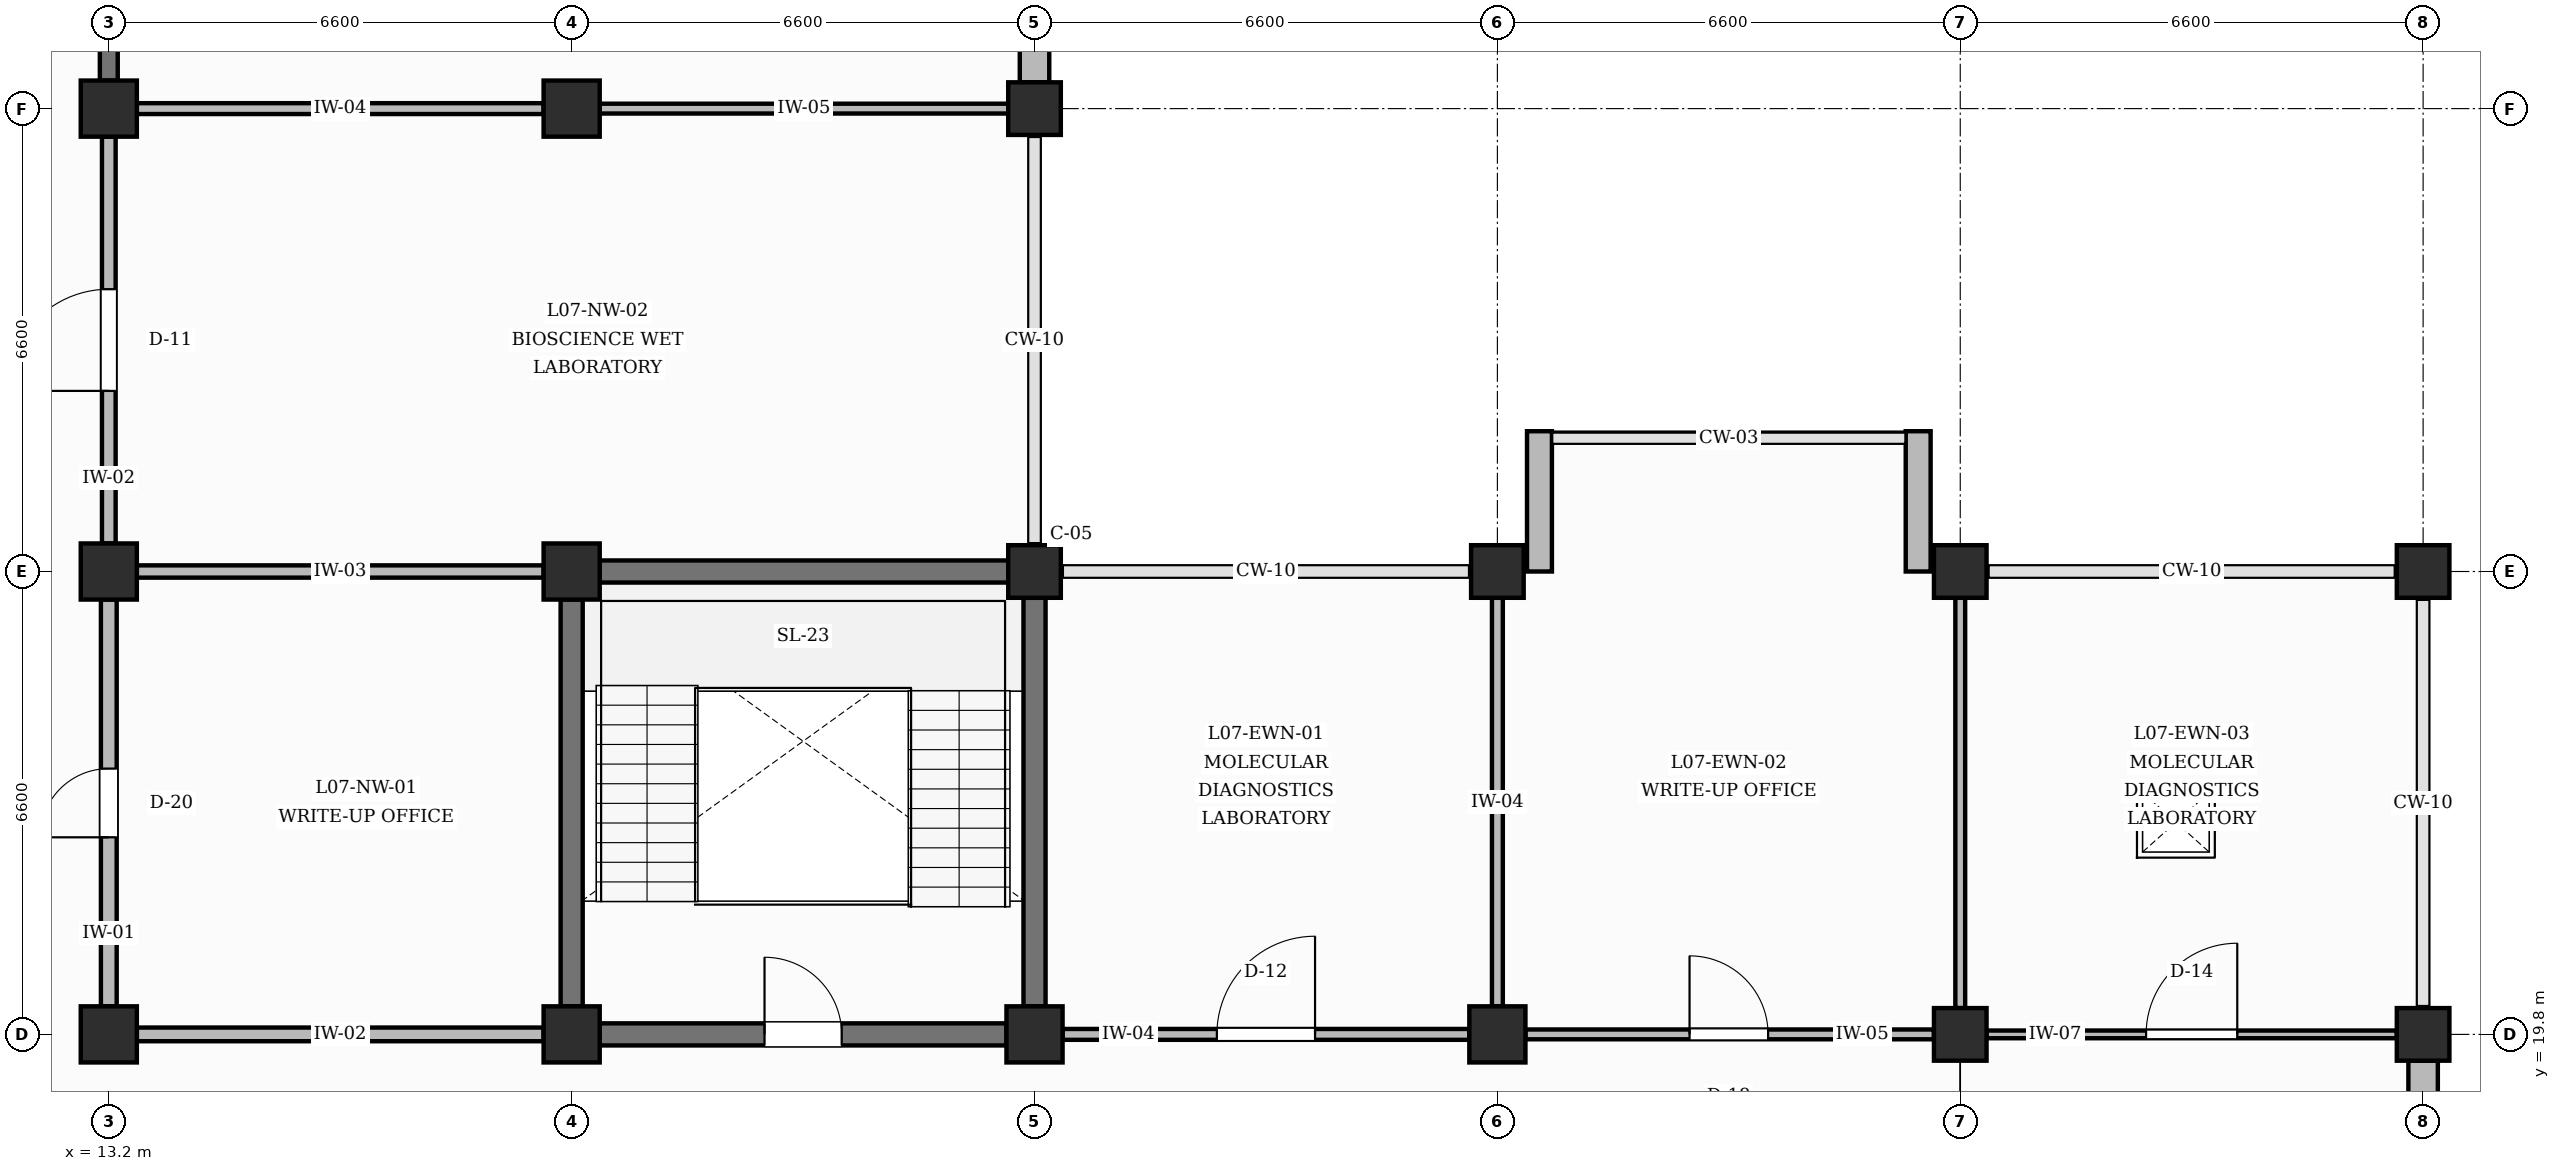
"""IFC4 building model, lengths in metres.
Left out: names, types, materials, properties, quantities, classifications, styles, units other than length and angle.
Written with IfcOpenShell. Run it as: python <this file> out.ifc"""

import sys

from ifc_helpers import new_model, si_unit, direction, frame, frame_2d, origin, origin_2d, place, context, subcontext, project, spatial, rectangle, extrude, element, fill, save


model = new_model("IFC4")
c1 = context("Model", 3, precision=1e-05, world=origin(), true_north=direction((0.0, 1.0)))
c2 = subcontext(c1, "Body", "Model", "MODEL_VIEW")
j1 = project(units=[si_unit("LENGTHUNIT", "METRE"), si_unit("PLANEANGLEUNIT", "RADIAN")], contexts=[c1])
p1 = place(None, origin())
s1 = spatial("IfcSite", under=j1, at=p1, CompositionType="ELEMENT")
p2 = place(p1, origin())
s2 = spatial("IfcBuilding", under=s1, at=p2, CompositionType="ELEMENT")
p3 = place(p2, frame((0.0, 0.0, 31.2)))
s3 = spatial("IfcBuildingStorey", under=s2, at=p3, CompositionType="ELEMENT", Elevation=31.2)
for number, where, z_axis, x_axis in (
    (1, (13.2, 19.8, 0.0), (0.0, 0.0, 1.0), (1.0, 0.0, 0.0)),
    (2, (13.2, 26.4, 0.0), (0.0, 0.0, 1.0), (1.0, 0.0, 0.0)),
    (3, (13.2, 33.0, 0.0), (0.0, 0.0, 1.0), (1.0, 0.0, 0.0)),
    (4, (19.8, 19.8, 0.0), (0.0, 0.0, 1.0), (1.0, 0.0, 0.0)),
    (5, (19.8, 26.4, 0.0), (0.0, 0.0, 1.0), (1.0, 0.0, 0.0)),
    (6, (19.8, 33.0, 0.0), (0.0, 0.0, 1.0), (1.0, 0.0, 0.0)),
    (7, (26.4, 19.8, 0.0), (0.0, 0.0, 1.0), (1.0, 0.0, 0.0)),
):
    element("IfcColumn", number, at=place(p3, frame(where, z_axis=z_axis, x_axis=x_axis)), inside=s3, PredefinedType="COLUMN", context=c2, shape_type="SweptSolid", body=[
        extrude(rectangle(XDim=0.8, YDim=0.8, at=origin_2d()), origin(), (0.0, 0.0, 1.0), 4.2),
    ])
for number, where, z_axis, x_axis in (
    (8, (26.4, 26.4, 0.0), (0.0, 0.0, 1.0), (1.0, 0.0, 0.0)),
    (9, (26.4, 33.0, 0.0), (0.0, 0.0, 1.0), (1.0, 0.0, 0.0)),
):
    element("IfcColumn", number, at=place(p3, frame(where, z_axis=z_axis, x_axis=x_axis)), inside=s3, PredefinedType="COLUMN", context=c2, shape_type="SweptSolid", body=[
        extrude(rectangle(XDim=0.75, YDim=0.75, at=origin_2d()), origin(), (0.0, 0.0, 1.0), 4.2),
    ])
p4 = place(p3, frame((33.0, 19.8, 0.0), z_axis=(0.0, 0.0, 1.0), x_axis=(1.0, 0.0, 0.0)))
e10 = element("IfcColumn", 10, at=p4, inside=s3, PredefinedType="COLUMN", context=c2, shape_type="SweptSolid", body=[
    extrude(rectangle(XDim=0.8, YDim=0.8, at=origin_2d()), origin(), (0.0, 0.0, 1.0), 4.2),
])
for number, where, z_axis, x_axis in (
    (11, (33.0, 26.4, 0.0), (0.0, 0.0, 1.0), (1.0, 0.0, 0.0)),
    (12, (39.6, 19.8, 0.0), (0.0, 0.0, 1.0), (1.0, 0.0, 0.0)),
    (13, (39.6, 26.4, 0.0), (0.0, 0.0, 1.0), (1.0, 0.0, 0.0)),
    (14, (46.2, 19.8, 0.0), (0.0, 0.0, 1.0), (1.0, 0.0, 0.0)),
    (15, (46.2, 26.4, 0.0), (0.0, 0.0, 1.0), (1.0, 0.0, 0.0)),
):
    element("IfcColumn", number, at=place(p3, frame(where, z_axis=z_axis, x_axis=x_axis)), inside=s3, PredefinedType="COLUMN", context=c2, shape_type="SweptSolid", body=[
        extrude(rectangle(XDim=0.75, YDim=0.75, at=origin_2d()), origin(), (0.0, 0.0, 1.0), 4.2),
    ])
p5 = place(p3, frame((26.4, 33.375, 0.0), z_axis=(0.0, 0.0, 1.0), x_axis=(0.0, 1.0, 0.0)))
e16 = element("IfcWall", 16, at=p5, inside=s3, PredefinedType="SOLIDWALL", context=c2, shape_type="SweptSolid", body=[
    extrude(rectangle(XDim=5.85, YDim=0.42, at=frame_2d((2.925, 0.0))), origin(), (0.0, 0.0, 1.0), 3.28),
])
p6 = place(p5, frame((1.715, 0.0, 0.95)))
e17 = element("IfcOpeningElement", 17, at=p6, cuts=e16, PredefinedType="OPENING", context=c2, shape_type="SweptSolid", body=[
    extrude(rectangle(XDim=2.42, YDim=1.68, at=frame_2d((1.21, 0.84))), frame((0.0, 0.22, 0.0), z_axis=(0.0, -1.0, 0.0), x_axis=(1.0, 0.0, 0.0)), (0.0, 0.0, 1.0), 0.44),
])
for number, where, z_axis, x_axis in (
    (18, (33.6, 26.4, 0.0), (0.0, 0.0, 1.0), (0.0, 1.0, 0.0)),
    (19, (39.0, 26.4, 0.0), (0.0, 0.0, 1.0), (0.0, 1.0, 0.0)),
):
    element("IfcWall", number, at=place(p3, frame(where, z_axis=z_axis, x_axis=x_axis)), inside=s3, PredefinedType="SOLIDWALL", context=c2, shape_type="SweptSolid", body=[
        extrude(rectangle(XDim=2.0, YDim=0.355, at=frame_2d((1.0, 0.0))), origin(), (0.0, 0.0, 1.0), 3.28),
    ])
p7 = place(p3, frame((46.2, 13.575, 0.0), z_axis=(0.0, 0.0, 1.0), x_axis=(0.0, 1.0, 0.0)))
e20 = element("IfcWall", 20, at=p7, inside=s3, PredefinedType="SOLIDWALL", context=c2, shape_type="SweptSolid", body=[
    extrude(rectangle(XDim=5.85, YDim=0.42, at=frame_2d((2.925, 0.0))), origin(), (0.0, 0.0, 1.0), 3.28),
])
p8 = place(p7, frame((0.8, 0.0, 0.95)))
e21 = element("IfcOpeningElement", 21, at=p8, cuts=e20, PredefinedType="OPENING", context=c2, shape_type="SweptSolid", body=[
    extrude(rectangle(XDim=1.02, YDim=1.3, at=frame_2d((0.51, 0.65))), frame((0.0, 0.22, 0.0), z_axis=(0.0, -1.0, 0.0), x_axis=(1.0, 0.0, 0.0)), (0.0, 0.0, 1.0), 0.44),
])
p9 = place(p7, frame((4.03, 0.0, 0.95)))
e22 = element("IfcOpeningElement", 22, at=p9, cuts=e20, PredefinedType="OPENING", context=c2, shape_type="SweptSolid", body=[
    extrude(rectangle(XDim=1.02, YDim=1.3, at=frame_2d((0.51, 0.65))), frame((0.0, 0.22, 0.0), z_axis=(0.0, -1.0, 0.0), x_axis=(1.0, 0.0, 0.0)), (0.0, 0.0, 1.0), 0.44),
])
p10 = place(p3, frame((20.2, 19.8, 0.0), z_axis=(0.0, 0.0, 1.0), x_axis=(1.0, 0.0, 0.0)))
e23 = element("IfcWall", 23, at=p10, inside=s3, PredefinedType="SHEAR", context=c2, shape_type="SweptSolid", body=[
    extrude(rectangle(XDim=5.8, YDim=0.315, at=frame_2d((2.9, 0.0))), origin(), (0.0, 0.0, 1.0), 3.18),
])
p11 = place(p10, frame((2.35, 0.0, 0.0)))
e24 = element("IfcOpeningElement", 24, at=p11, cuts=e23, PredefinedType="OPENING", context=c2, shape_type="SweptSolid", body=[
    extrude(rectangle(XDim=1.1, YDim=2.15, at=frame_2d((0.55, 1.075))), frame((0.0, 0.167, 0.0), z_axis=(0.0, -1.0, 0.0), x_axis=(1.0, 0.0, 0.0)), (0.0, 0.0, 1.0), 0.335),
])
p12 = place(p3, frame((20.2, 26.4, 0.0), z_axis=(0.0, 0.0, 1.0), x_axis=(1.0, 0.0, 0.0)))
e25 = element("IfcWall", 25, at=p12, inside=s3, PredefinedType="SHEAR", context=c2, shape_type="SweptSolid", body=[
    extrude(rectangle(XDim=5.825, YDim=0.315, at=frame_2d((2.913, 0.0))), origin(), (0.0, 0.0, 1.0), 3.18),
])
p13 = place(p3, frame((19.8, 20.2, 0.0), z_axis=(0.0, 0.0, 1.0), x_axis=(0.0, 1.0, 0.0)))
e26 = element("IfcWall", 26, at=p13, inside=s3, PredefinedType="SHEAR", context=c2, shape_type="SweptSolid", body=[
    extrude(rectangle(XDim=5.8, YDim=0.315, at=frame_2d((2.9, 0.0))), origin(), (0.0, 0.0, 1.0), 3.18),
])
p14 = place(p3, frame((26.4, 20.2, 0.0), z_axis=(0.0, 0.0, 1.0), x_axis=(0.0, 1.0, 0.0)))
e27 = element("IfcWall", 27, at=p14, inside=s3, PredefinedType="SHEAR", context=c2, shape_type="SweptSolid", body=[
    extrude(rectangle(XDim=5.825, YDim=0.315, at=frame_2d((2.913, 0.0))), origin(), (0.0, 0.0, 1.0), 3.18),
])
p15 = place(p3, frame((13.2, 20.2, 0.0), z_axis=(0.0, 0.0, 1.0), x_axis=(0.0, 1.0, 0.0)))
e28 = element("IfcWall", 28, at=p15, inside=s3, PredefinedType="PARTITIONING", context=c2, shape_type="SweptSolid", body=[
    extrude(rectangle(XDim=5.8, YDim=0.225, at=frame_2d((2.9, 0.0))), origin(), (0.0, 0.0, 1.0), 3.18),
])
p16 = place(p15, frame((2.41, 0.0, 0.0)))
e29 = element("IfcOpeningElement", 29, at=p16, cuts=e28, PredefinedType="OPENING", context=c2, shape_type="SweptSolid", body=[
    extrude(rectangle(XDim=0.98, YDim=2.15, at=frame_2d((0.49, 1.075))), frame((0.0, 0.123, 0.0), z_axis=(0.0, -1.0, 0.0), x_axis=(1.0, 0.0, 0.0)), (0.0, 0.0, 1.0), 0.245),
])
p17 = place(p3, frame((13.2, 26.8, 0.0), z_axis=(0.0, 0.0, 1.0), x_axis=(0.0, 1.0, 0.0)))
e30 = element("IfcWall", 30, at=p17, inside=s3, PredefinedType="PARTITIONING", context=c2, shape_type="SweptSolid", body=[
    extrude(rectangle(XDim=5.8, YDim=0.195, at=frame_2d((2.9, 0.0))), origin(), (0.0, 0.0, 1.0), 3.18),
])
p18 = place(p17, frame((2.175, 0.0, 0.0)))
e31 = element("IfcOpeningElement", 31, at=p18, cuts=e30, PredefinedType="OPENING", context=c2, shape_type="SweptSolid", body=[
    extrude(rectangle(XDim=1.45, YDim=2.25, at=frame_2d((0.725, 1.125))), frame((0.0, 0.107, 0.0), z_axis=(0.0, -1.0, 0.0), x_axis=(1.0, 0.0, 0.0)), (0.0, 0.0, 1.0), 0.215),
])
p19 = place(p3, frame((13.2, 33.4, 0.0), z_axis=(0.0, 0.0, 1.0), x_axis=(0.0, 1.0, 0.0)))
e32 = element("IfcWall", 32, at=p19, inside=s3, PredefinedType="SHEAR", context=c2, shape_type="SweptSolid", body=[
    extrude(rectangle(XDim=5.8, YDim=0.255, at=frame_2d((2.9, 0.0))), origin(), (0.0, 0.0, 1.0), 3.18),
])
p20 = place(p19, frame((2.2, 0.0, 0.0)))
e33 = element("IfcOpeningElement", 33, at=p20, cuts=e32, PredefinedType="OPENING", context=c2, shape_type="SweptSolid", body=[
    extrude(rectangle(XDim=1.4, YDim=2.25, at=frame_2d((0.7, 1.125))), frame((0.0, 0.137, 0.0), z_axis=(0.0, -1.0, 0.0), x_axis=(1.0, 0.0, 0.0)), (0.0, 0.0, 1.0), 0.275),
])
p21 = place(p3, frame((13.6, 19.8, 0.0), z_axis=(0.0, 0.0, 1.0), x_axis=(1.0, 0.0, 0.0)))
e34 = element("IfcWall", 34, at=p21, inside=s3, PredefinedType="PARTITIONING", context=c2, shape_type="SweptSolid", body=[
    extrude(rectangle(XDim=5.8, YDim=0.195, at=frame_2d((2.9, 0.0))), origin(), (0.0, 0.0, 1.0), 3.18),
])
p22 = place(p3, frame((13.6, 26.4, 0.0), z_axis=(0.0, 0.0, 1.0), x_axis=(1.0, 0.0, 0.0)))
e35 = element("IfcWall", 35, at=p22, inside=s3, PredefinedType="PARTITIONING", context=c2, shape_type="SweptSolid", body=[
    extrude(rectangle(XDim=5.8, YDim=0.175, at=frame_2d((2.9, 0.0))), origin(), (0.0, 0.0, 1.0), 3.18),
])
p23 = place(p3, frame((13.6, 33.0, 0.0), z_axis=(0.0, 0.0, 1.0), x_axis=(1.0, 0.0, 0.0)))
e36 = element("IfcWall", 36, at=p23, inside=s3, PredefinedType="PARTITIONING", context=c2, shape_type="SweptSolid", body=[
    extrude(rectangle(XDim=5.8, YDim=0.155, at=frame_2d((2.9, 0.0))), origin(), (0.0, 0.0, 1.0), 3.18),
])
p24 = place(p3, frame((20.2, 33.0, 0.0), z_axis=(0.0, 0.0, 1.0), x_axis=(1.0, 0.0, 0.0)))
e37 = element("IfcWall", 37, at=p24, inside=s3, PredefinedType="PARTITIONING", context=c2, shape_type="SweptSolid", body=[
    extrude(rectangle(XDim=5.825, YDim=0.14, at=frame_2d((2.913, 0.0))), origin(), (0.0, 0.0, 1.0), 3.43),
])
p25 = place(p3, frame((26.8, 19.8, 0.0), z_axis=(0.0, 0.0, 1.0), x_axis=(1.0, 0.0, 0.0)))
e38 = element("IfcWall", 38, at=p25, inside=s3, PredefinedType="PARTITIONING", context=c2, shape_type="SweptSolid", body=[
    extrude(rectangle(XDim=5.8, YDim=0.155, at=frame_2d((2.9, 0.0))), origin(), (0.0, 0.0, 1.0), 3.18),
])
p26 = place(p25, frame((2.2, 0.0, 0.0)))
e39 = element("IfcOpeningElement", 39, at=p26, cuts=e38, PredefinedType="OPENING", context=c2, shape_type="SweptSolid", body=[
    extrude(rectangle(XDim=1.4, YDim=2.25, at=frame_2d((0.7, 1.125))), frame((0.0, 0.087, 0.0), z_axis=(0.0, -1.0, 0.0), x_axis=(1.0, 0.0, 0.0)), (0.0, 0.0, 1.0), 0.175),
])
p27 = place(p3, frame((33.0, 20.2, 0.0), z_axis=(0.0, 0.0, 1.0), x_axis=(0.0, 1.0, 0.0)))
e40 = element("IfcWall", 40, at=p27, inside=s3, PredefinedType="PARTITIONING", context=c2, shape_type="SweptSolid", body=[
    extrude(rectangle(XDim=5.825, YDim=0.155, at=frame_2d((2.913, 0.0))), origin(), (0.0, 0.0, 1.0), 3.43),
])
p28 = place(p3, frame((33.4, 19.8, 0.0), z_axis=(0.0, 0.0, 1.0), x_axis=(1.0, 0.0, 0.0)))
e41 = element("IfcWall", 41, at=p28, inside=s3, PredefinedType="PARTITIONING", context=c2, shape_type="SweptSolid", body=[
    extrude(rectangle(XDim=5.825, YDim=0.14, at=frame_2d((2.913, 0.0))), origin(), (0.0, 0.0, 1.0), 3.18),
])
p29 = place(p28, frame((2.34, 0.0, 0.0)))
e42 = element("IfcOpeningElement", 42, at=p29, cuts=e41, PredefinedType="OPENING", context=c2, shape_type="SweptSolid", body=[
    extrude(rectangle(XDim=1.12, YDim=2.2, at=frame_2d((0.56, 1.1))), frame((0.0, 0.08, 0.0), z_axis=(0.0, -1.0, 0.0), x_axis=(1.0, 0.0, 0.0)), (0.0, 0.0, 1.0), 0.16),
])
p30 = place(p3, frame((39.6, 20.175, 0.0), z_axis=(0.0, 0.0, 1.0), x_axis=(0.0, 1.0, 0.0)))
e43 = element("IfcWall", 43, at=p30, inside=s3, PredefinedType="PARTITIONING", context=c2, shape_type="SweptSolid", body=[
    extrude(rectangle(XDim=5.85, YDim=0.14, at=frame_2d((2.925, 0.0))), origin(), (0.0, 0.0, 1.0), 3.43),
])
p31 = place(p3, frame((39.975, 19.8, 0.0), z_axis=(0.0, 0.0, 1.0), x_axis=(1.0, 0.0, 0.0)))
e44 = element("IfcWall", 44, at=p31, inside=s3, PredefinedType="PARTITIONING", context=c2, shape_type="SweptSolid", body=[
    extrude(rectangle(XDim=5.85, YDim=0.11, at=frame_2d((2.925, 0.0))), origin(), (0.0, 0.0, 1.0), 3.18),
])
p32 = place(p31, frame((2.275, 0.0, 0.0)))
e45 = element("IfcOpeningElement", 45, at=p32, cuts=e44, PredefinedType="OPENING", context=c2, shape_type="SweptSolid", body=[
    extrude(rectangle(XDim=1.3, YDim=2.3, at=frame_2d((0.65, 1.15))), frame((0.0, 0.065, 0.0), z_axis=(0.0, -1.0, 0.0), x_axis=(1.0, 0.0, 0.0)), (0.0, 0.0, 1.0), 0.13),
])
p33 = place(p11, origin())
e46 = element("IfcDoor", 46, at=p33, inside=s3, OperationType="SINGLE_SWING_LEFT", PredefinedType="DOOR", context=c2, shape_type="SweptSolid", body=[
    extrude(rectangle(XDim=1.1, YDim=2.15, at=frame_2d((0.55, 1.075))), frame((0.0, 0.025, 0.0), z_axis=(0.0, -1.0, 0.0), x_axis=(1.0, 0.0, 0.0)), (0.0, 0.0, 1.0), 0.05),
])
fill(e24, e46)
p34 = place(p16, origin())
e47 = element("IfcDoor", 47, at=p34, inside=s3, OperationType="SINGLE_SWING_LEFT", PredefinedType="DOOR", context=c2, shape_type="SweptSolid", body=[
    extrude(rectangle(XDim=0.98, YDim=2.15, at=frame_2d((0.49, 1.075))), frame((0.0, 0.025, 0.0), z_axis=(0.0, -1.0, 0.0), x_axis=(1.0, 0.0, 0.0)), (0.0, 0.0, 1.0), 0.05),
])
fill(e29, e47)
p35 = place(p18, origin())
e48 = element("IfcDoor", 48, at=p35, inside=s3, OperationType="SINGLE_SWING_LEFT", PredefinedType="DOOR", context=c2, shape_type="SweptSolid", body=[
    extrude(rectangle(XDim=1.45, YDim=2.25, at=frame_2d((0.725, 1.125))), frame((0.0, 0.025, 0.0), z_axis=(0.0, -1.0, 0.0), x_axis=(1.0, 0.0, 0.0)), (0.0, 0.0, 1.0), 0.05),
])
fill(e31, e48)
p36 = place(p26, origin())
e49 = element("IfcDoor", 49, at=p36, inside=s3, OperationType="SINGLE_SWING_RIGHT", PredefinedType="DOOR", context=c2, shape_type="SweptSolid", body=[
    extrude(rectangle(XDim=1.4, YDim=2.25, at=frame_2d((0.7, 1.125))), frame((0.0, 0.025, 0.0), z_axis=(0.0, -1.0, 0.0), x_axis=(1.0, 0.0, 0.0)), (0.0, 0.0, 1.0), 0.05),
])
fill(e39, e49)
p37 = place(p29, origin())
e50 = element("IfcDoor", 50, at=p37, inside=s3, OperationType="SINGLE_SWING_LEFT", PredefinedType="DOOR", context=c2, shape_type="SweptSolid", body=[
    extrude(rectangle(XDim=1.12, YDim=2.2, at=frame_2d((0.56, 1.1))), frame((0.0, 0.025, 0.0), z_axis=(0.0, -1.0, 0.0), x_axis=(1.0, 0.0, 0.0)), (0.0, 0.0, 1.0), 0.05),
])
fill(e42, e50)
p38 = place(p32, origin())
e51 = element("IfcDoor", 51, at=p38, inside=s3, OperationType="SINGLE_SWING_RIGHT", PredefinedType="DOOR", context=c2, shape_type="SweptSolid", body=[
    extrude(rectangle(XDim=1.3, YDim=2.3, at=frame_2d((0.65, 1.15))), frame((0.0, 0.025, 0.0), z_axis=(0.0, -1.0, 0.0), x_axis=(1.0, 0.0, 0.0)), (0.0, 0.0, 1.0), 0.05),
])
fill(e45, e51)
save(model, sys.argv[1])
